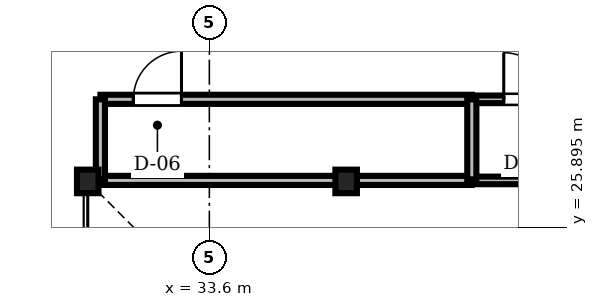
"""IFC4 building model, lengths in metres.
Left out: names, types, materials, properties, quantities, classifications, styles, units other than length and angle.
Written with IfcOpenShell. Run it as: python <this file> out.ifc"""

import sys

from ifc_helpers import new_model, si_unit, direction, frame, frame_2d, origin, origin_2d, place, context, subcontext, project, spatial, rectangle, i_section, extrude, source, transform, mapped, element, fill, save


model = new_model("IFC4")
c1 = context("Model", 3, precision=1e-05, world=origin(), true_north=direction((0.0, 1.0)))
c2 = subcontext(c1, "Body", "Model", "MODEL_VIEW")
j1 = project(units=[si_unit("LENGTHUNIT", "METRE"), si_unit("PLANEANGLEUNIT", "RADIAN")], contexts=[c1])
p1 = place(None, origin())
s1 = spatial("IfcSite", under=j1, at=p1, CompositionType="ELEMENT")
p2 = place(p1, origin())
s2 = spatial("IfcBuilding", under=s1, at=p2, CompositionType="ELEMENT")
p3 = place(p2, frame((0.0, 0.0, 140.9)))
s3 = spatial("IfcBuildingStorey", under=s2, at=p3, CompositionType="ELEMENT", Elevation=140.9)
m1 = source(origin(), c2, "Body", "SweptSolid", [
    extrude(i_section(OverallWidth=0.424, OverallDepth=0.465, WebThickness=0.035, FlangeThickness=0.056, FilletRadius=0.015, at=origin_2d()), origin(), (0.0, 0.0, 1.0), 3.46),
])
for number, where, z_axis, x_axis in (
    (1, (36.3, 26.8, 0.0), (0.0, 0.0, 1.0), (1.0, 0.0, 0.0)),
    (2, (31.2, 26.8, 0.0), (0.0, 0.0, 1.0), (1.0, 0.0, 0.0)),
):
    element("IfcColumn", number, at=place(p3, frame(where, z_axis=z_axis, x_axis=x_axis)), inside=s3, PredefinedType="COLUMN", context=c2, shape_type="MappedRepresentation", body=[
        mapped(m1, transform((0.0, 0.0, 0.0), scale=1.0)),
    ])
m2 = source(origin(), c2, "Body", "SweptSolid", [
    extrude(rectangle(XDim=7.33, YDim=0.18, at=frame_2d((3.665, 0.0))), origin(), (0.0, 0.0, 1.0), 3.092),
])
p4 = place(p3, frame((31.45, 28.42, 0.0), z_axis=(0.0, 0.0, 1.0), x_axis=(1.0, 0.0, 0.0)))
e3 = element("IfcWall", 3, at=p4, inside=s3, PredefinedType="PARTITIONING", context=c2, shape_type="MappedRepresentation", body=[
    mapped(m2, transform((0.0, 0.0, 0.0), scale=1.0)),
])
m3 = source(origin(), c2, "Body", "SweptSolid", [
    extrude(rectangle(XDim=0.95, YDim=2.15, at=frame_2d((0.475, 1.075))), frame((0.0, 0.1, 0.0), z_axis=(0.0, -1.0, 0.0), x_axis=(1.0, 0.0, 0.0)), (0.0, 0.0, 1.0), 0.2),
])
p5 = place(p4, frame((0.65, 0.0, 0.0)))
e4 = element("IfcOpeningElement", 4, at=p5, cuts=e3, PredefinedType="OPENING", context=c2, shape_type="MappedRepresentation", body=[
    mapped(m3, transform((0.0, 0.0, 0.0), scale=1.0)),
])
m4 = source(origin(), c2, "Body", "SweptSolid", [
    extrude(rectangle(XDim=2.74, YDim=0.15, at=frame_2d((1.37, 0.0))), origin(), (0.0, 0.0, 1.0), 3.46),
])
p6 = place(p3, frame((38.78, 28.42, 0.0), z_axis=(0.0, 0.0, 1.0), x_axis=(1.0, 0.0, 0.0)))
e5 = element("IfcWall", 5, at=p6, inside=s3, PredefinedType="PARTITIONING", context=c2, shape_type="MappedRepresentation", body=[
    mapped(m4, transform((0.0, 0.0, 0.0), scale=1.0)),
])
m5 = source(origin(), c2, "Body", "SweptSolid", [
    extrude(rectangle(XDim=0.92, YDim=2.1, at=frame_2d((0.46, 1.05))), frame((0.0, 0.085, 0.0), z_axis=(0.0, -1.0, 0.0), x_axis=(1.0, 0.0, 0.0)), (0.0, 0.0, 1.0), 0.17),
])
p7 = place(p6, frame((0.63, 0.0, 0.0)))
e6 = element("IfcOpeningElement", 6, at=p7, cuts=e5, PredefinedType="OPENING", context=c2, shape_type="MappedRepresentation", body=[
    mapped(m5, transform((0.0, 0.0, 0.0), scale=1.0)),
])
m6 = source(origin(), c2, "Body", "SweptSolid", [
    extrude(rectangle(XDim=7.33, YDim=0.18, at=frame_2d((3.665, 0.0))), origin(), (0.0, 0.0, 1.0), 3.002),
])
p8 = place(p3, frame((31.45, 26.82, 0.0), z_axis=(0.0, 0.0, 1.0), x_axis=(1.0, 0.0, 0.0)))
e7 = element("IfcWall", 7, at=p8, inside=s3, PredefinedType="PARTITIONING", context=c2, shape_type="MappedRepresentation", body=[
    mapped(m6, transform((0.0, 0.0, 0.0), scale=1.0)),
])
m7 = source(origin(), c2, "Body", "SweptSolid", [
    extrude(rectangle(XDim=2.74, YDim=0.15, at=frame_2d((1.37, 0.0))), origin(), (0.0, 0.0, 1.0), 2.852),
])
p9 = place(p3, frame((38.78, 26.82, 0.0), z_axis=(0.0, 0.0, 1.0), x_axis=(1.0, 0.0, 0.0)))
e8 = element("IfcWall", 8, at=p9, inside=s3, PredefinedType="PARTITIONING", context=c2, shape_type="MappedRepresentation", body=[
    mapped(m7, transform((0.0, 0.0, 0.0), scale=1.0)),
])
m8 = source(origin(), c2, "Body", "SweptSolid", [
    extrude(rectangle(XDim=1.6, YDim=0.18, at=frame_2d((0.8, 0.0))), origin(), (0.0, 0.0, 1.0), 3.002),
])
for number, where, z_axis, x_axis in (
    (9, (31.45, 26.82, 0.0), (0.0, 0.0, 1.0), (0.0, 1.0, 0.0)),
    (10, (38.78, 26.82, 0.0), (0.0, 0.0, 1.0), (0.0, 1.0, 0.0)),
):
    element("IfcWall", number, at=place(p3, frame(where, z_axis=z_axis, x_axis=x_axis)), inside=s3, PredefinedType="PARTITIONING", context=c2, shape_type="MappedRepresentation", body=[
        mapped(m8, transform((0.0, 0.0, 0.0), scale=1.0)),
    ])
m9 = source(origin(), c2, "Body", "SweptSolid", [
    extrude(rectangle(XDim=0.95, YDim=2.15, at=frame_2d((0.475, 1.075))), frame((0.0, 0.025, 0.0), z_axis=(0.0, -1.0, 0.0), x_axis=(1.0, 0.0, 0.0)), (0.0, 0.0, 1.0), 0.05),
])
p10 = place(p5, origin())
e11 = element("IfcDoor", 11, at=p10, inside=s3, OperationType="SINGLE_SWING_RIGHT", PredefinedType="DOOR", context=c2, shape_type="MappedRepresentation", body=[
    mapped(m9, transform((0.0, 0.0, 0.0), scale=1.0)),
])
fill(e4, e11)
m10 = source(origin(), c2, "Body", "SweptSolid", [
    extrude(rectangle(XDim=0.92, YDim=2.1, at=frame_2d((0.46, 1.05))), frame((0.0, 0.025, 0.0), z_axis=(0.0, -1.0, 0.0), x_axis=(1.0, 0.0, 0.0)), (0.0, 0.0, 1.0), 0.05),
])
p11 = place(p7, origin())
e12 = element("IfcDoor", 12, at=p11, inside=s3, OperationType="SINGLE_SWING_LEFT", PredefinedType="DOOR", context=c2, shape_type="MappedRepresentation", body=[
    mapped(m10, transform((0.0, 0.0, 0.0), scale=1.0)),
])
fill(e6, e12)
save(model, sys.argv[1])
